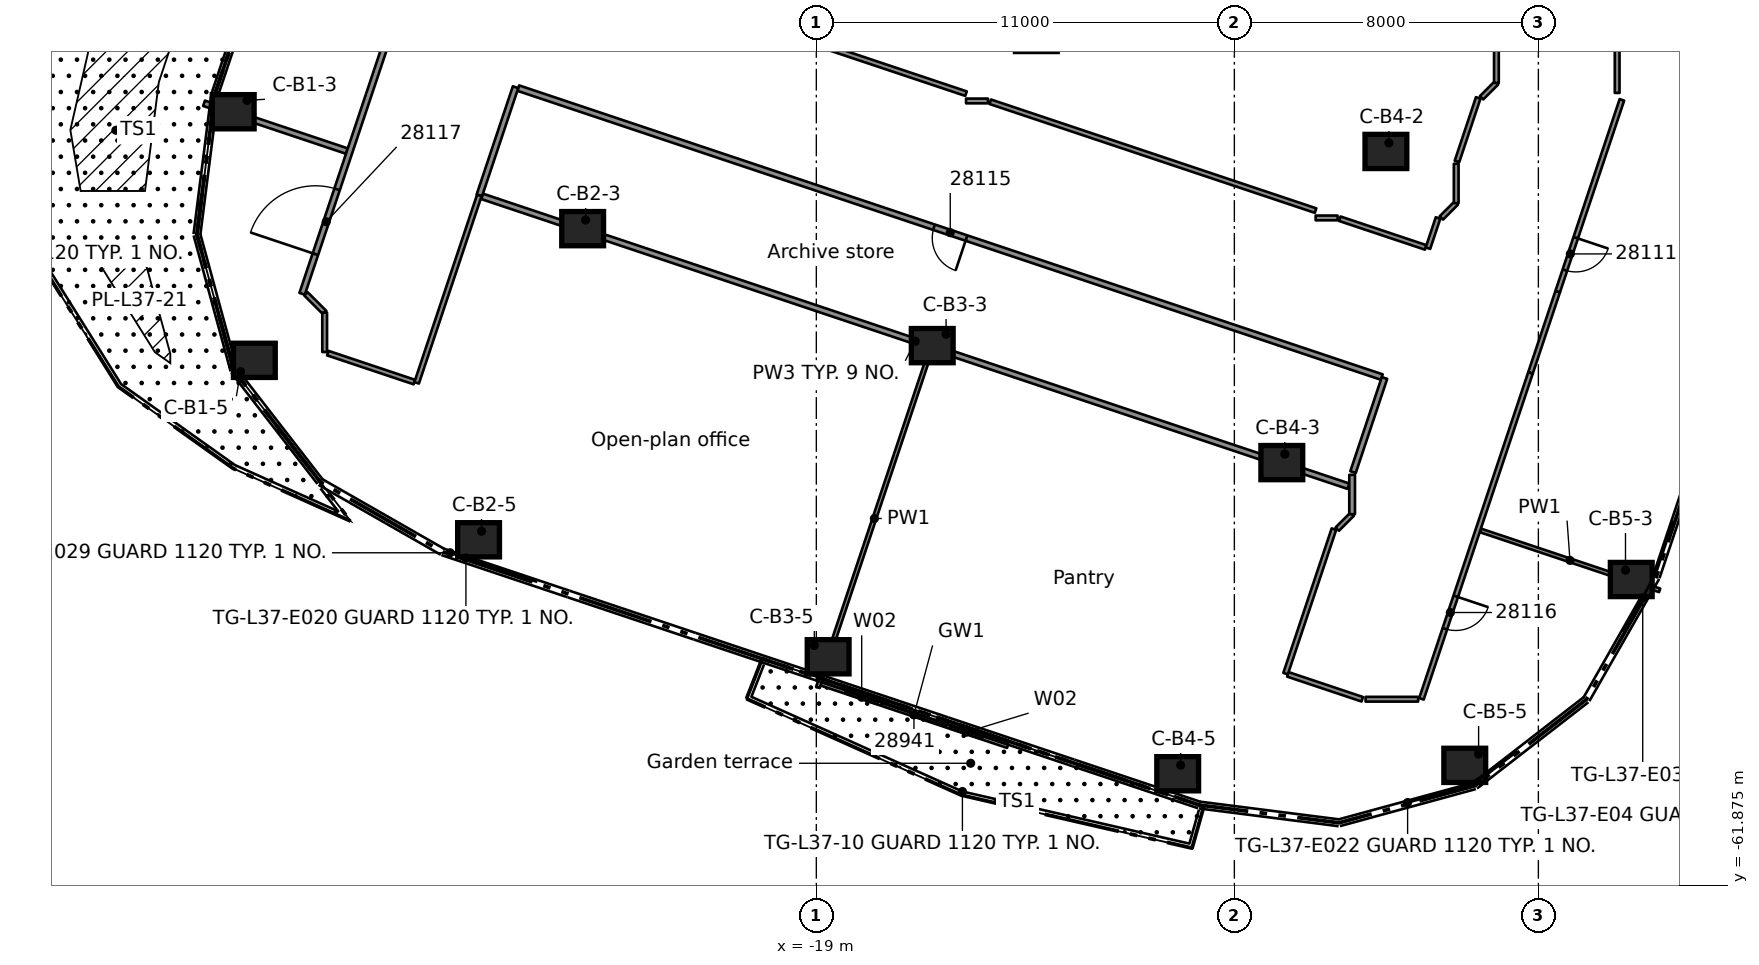
"""IFC4 building model, lengths in metres.
Left out: names, types, materials, properties, quantities, classifications, styles, units other than length and angle.
Written with IfcOpenShell. Run it as: python <this file> out.ifc"""

import sys

from ifc_helpers import new_model, si_unit, direction, frame, frame_2d, origin, origin_2d, place, context, subcontext, project, spatial, rectangle, extrude, element, fill, save


model = new_model("IFC4")
c1 = context("Model", 3, precision=1e-05, world=origin(), true_north=direction((0.0, 1.0)))
c2 = subcontext(c1, "Body", "Model", "MODEL_VIEW")
j1 = project(units=[si_unit("LENGTHUNIT", "METRE"), si_unit("PLANEANGLEUNIT", "RADIAN")], contexts=[c1])
p1 = place(None, origin())
s1 = spatial("IfcSite", under=j1, at=p1, CompositionType="ELEMENT")
p2 = place(p1, origin())
s2 = spatial("IfcBuilding", under=s1, at=p2, CompositionType="ELEMENT")
p3 = place(p2, frame((0.0, 0.0, 145.6)))
s3 = spatial("IfcBuildingStorey", under=s2, at=p3, CompositionType="ELEMENT", Elevation=145.6)
for number, where, z_axis, x_axis in (
    (1, (-34.344, -41.515, 0.0), (0.0, 0.0, 1.0), (1.0, 0.0, 0.0)),
    (2, (-33.788, -48.056, 0.0), (0.0, 0.0, 1.0), (1.0, 0.0, 0.0)),
    (3, (-25.149, -44.591, 0.0), (0.0, 0.0, 1.0), (1.0, 0.0, 0.0)),
    (4, (-27.888, -52.778, 0.0), (0.0, 0.0, 1.0), (1.0, 0.0, 0.0)),
    (5, (-15.95, -47.669, 0.0), (0.0, 0.0, 1.0), (1.0, 0.0, 0.0)),
    (6, (-18.689, -55.856, 0.0), (0.0, 0.0, 1.0), (1.0, 0.0, 0.0)),
    (7, (-4.012, -42.56, 0.0), (0.0, 0.0, 1.0), (1.0, 0.0, 0.0)),
    (8, (-6.751, -50.747, 0.0), (0.0, 0.0, 1.0), (1.0, 0.0, 0.0)),
    (9, (-9.491, -58.934, 0.0), (0.0, 0.0, 1.0), (1.0, 0.0, 0.0)),
    (10, (2.444, -53.823, 0.0), (0.0, 0.0, 1.0), (1.0, 0.0, 0.0)),
    (11, (-1.937, -58.713, 0.0), (0.0, 0.0, 1.0), (1.0, 0.0, 0.0)),
):
    element("IfcColumn", number, at=place(p3, frame(where, z_axis=z_axis, x_axis=x_axis)), inside=s3, PredefinedType="COLUMN", context=c2, shape_type="SweptSolid", body=[
        extrude(rectangle(XDim=1.1, YDim=0.9, at=origin_2d()), origin(), (0.0, 0.0, 1.0), 3.5),
    ])
p4 = place(p3, frame((-13.966, -58.207, 0.0), z_axis=(0.0, 0.0, 1.0), x_axis=(-0.948325862879, 0.31729805829, 0.0)))
e12 = element("IfcWall", 12, at=p4, inside=s3, PredefinedType="STANDARD", context=c2, shape_type="SweptSolid", body=[
    extrude(rectangle(XDim=5.2, YDim=0.1, at=frame_2d((2.6, 0.0))), origin(), (0.0, 0.0, 1.0), 3.1),
])
p5 = place(p4, frame((1.7, 0.0, 0.0)))
e13 = element("IfcOpeningElement", 13, at=p5, cuts=e12, PredefinedType="OPENING", context=c2, shape_type="SweptSolid", body=[
    extrude(rectangle(XDim=1.8, YDim=2.4, at=frame_2d((0.9, 1.2))), frame((0.0, 0.06, 0.0), z_axis=(0.0, -1.0, 0.0), x_axis=(1.0, 0.0, 0.0)), (0.0, 0.0, 1.0), 0.12),
])
p6 = place(p4, frame((0.7, 0.0, 0.0)))
e14 = element("IfcOpeningElement", 14, at=p6, cuts=e12, PredefinedType="OPENING", context=c2, shape_type="SweptSolid", body=[
    extrude(rectangle(XDim=0.9, YDim=2.4, at=frame_2d((0.45, 1.2))), frame((0.0, 0.06, 0.0), z_axis=(0.0, -1.0, 0.0), x_axis=(1.0, 0.0, 0.0)), (0.0, 0.0, 1.0), 0.12),
])
p7 = place(p4, frame((3.6, 0.0, 0.0)))
e15 = element("IfcOpeningElement", 15, at=p7, cuts=e12, PredefinedType="OPENING", context=c2, shape_type="SweptSolid", body=[
    extrude(rectangle(XDim=0.9, YDim=2.4, at=frame_2d((0.45, 1.2))), frame((0.0, 0.06, 0.0), z_axis=(0.0, -1.0, 0.0), x_axis=(1.0, 0.0, 0.0)), (0.0, 0.0, 1.0), 0.12),
])
p8 = place(p3, frame((-31.856, -47.866, 0.0), z_axis=(0.0, 0.0, 1.0), x_axis=(0.948398445466, -0.317081044274, 0.0)))
e16 = element("IfcWall", 16, at=p8, inside=s3, PredefinedType="PARTITIONING", context=c2, shape_type="SweptSolid", body=[
    extrude(rectangle(XDim=2.403, YDim=0.125, at=frame_2d((1.202, 0.0))), origin(), (0.0, 0.0, 1.0), 3.08),
])
p9 = place(p3, frame((-6.592, -56.319, 0.0), z_axis=(0.0, 0.0, 1.0), x_axis=(0.948339824369, -0.317256327778, 0.0)))
e17 = element("IfcWall", 17, at=p9, inside=s3, PredefinedType="PARTITIONING", context=c2, shape_type="SweptSolid", body=[
    extrude(rectangle(XDim=2.065, YDim=0.125, at=frame_2d((1.032, 0.0))), origin(), (0.0, 0.0, 1.0), 3.08),
])
p10 = place(p3, frame((-35.112, -41.292, 0.0), z_axis=(0.0, 0.0, 1.0), x_axis=(0.948300748581, -0.317373108881, 0.0)))
e18 = element("IfcWall", 18, at=p10, inside=s3, PredefinedType="PARTITIONING", context=c2, shape_type="SweptSolid", body=[
    extrude(rectangle(XDim=3.964, YDim=0.15, at=frame_2d((1.982, 0.0))), origin(), (0.0, 0.0, 1.0), 3.08),
])
p11 = place(p3, frame((-27.797, -43.741, 0.0), z_axis=(0.0, 0.0, 1.0), x_axis=(0.948342550157, -0.31724817976, 0.0)))
e19 = element("IfcWall", 19, at=p11, inside=s3, PredefinedType="PARTITIONING", context=c2, shape_type="SweptSolid", body=[
    extrude(rectangle(XDim=24.041, YDim=0.15, at=frame_2d((12.021, 0.0))), origin(), (0.0, 0.0, 1.0), 3.08),
])
p12 = place(p3, frame((-1.528, -52.53, 0.0), z_axis=(0.0, 0.0, 1.0), x_axis=(0.948388493502, -0.317110809328, 0.0)))
e20 = element("IfcWall", 20, at=p12, inside=s3, PredefinedType="PARTITIONING", context=c2, shape_type="SweptSolid", body=[
    extrude(rectangle(XDim=4.976, YDim=0.1, at=frame_2d((2.488, 0.0))), origin(), (0.0, 0.0, 1.0), 3.08),
])
p13 = place(p3, frame((-4.12, -48.496, 0.0), z_axis=(0.0, 0.0, 1.0), x_axis=(-0.948327115108, 0.31729431566, 0.0)))
e21 = element("IfcWall", 21, at=p13, inside=s3, PredefinedType="PARTITIONING", context=c2, shape_type="SweptSolid", body=[
    extrude(rectangle(XDim=23.962, YDim=0.15, at=frame_2d((11.981, 0.0))), origin(), (0.0, 0.0, 1.0), 3.08),
])
p14 = place(p13, frame((11.525, 0.0, 0.0)))
e22 = element("IfcOpeningElement", 22, at=p14, cuts=e21, PredefinedType="OPENING", context=c2, shape_type="SweptSolid", body=[
    extrude(rectangle(XDim=0.9, YDim=2.1, at=frame_2d((0.45, 1.05))), frame((0.0, 0.085, 0.0), z_axis=(0.0, -1.0, 0.0), x_axis=(1.0, 0.0, 0.0)), (0.0, 0.0, 1.0), 0.17),
])
p15 = place(p3, frame((-23.623, -38.174, 0.0), z_axis=(0.0, 0.0, 1.0), x_axis=(0.948317616384, -0.317322703971, 0.0)))
e23 = element("IfcWall", 23, at=p15, inside=s3, PredefinedType="PARTITIONING", context=c2, shape_type="SweptSolid", body=[
    extrude(rectangle(XDim=9.029, YDim=0.125, at=frame_2d((4.514, 0.0))), origin(), (0.0, 0.0, 1.0), 3.08),
])
p16 = place(p15, frame((4.038, 0.0, 0.0)))
e24 = element("IfcOpeningElement", 24, at=p16, cuts=e23, PredefinedType="OPENING", context=c2, shape_type="SweptSolid", body=[
    extrude(rectangle(XDim=0.9, YDim=2.1, at=frame_2d((0.45, 1.05))), frame((0.0, 0.073, 0.0), z_axis=(0.0, -1.0, 0.0), x_axis=(1.0, 0.0, 0.0)), (0.0, 0.0, 1.0), 0.145),
])
p17 = place(p3, frame((-14.424, -41.252, 0.0), z_axis=(0.0, 0.0, 1.0), x_axis=(0.948339274477, -0.317257971508, 0.0)))
e25 = element("IfcWall", 25, at=p17, inside=s3, PredefinedType="PARTITIONING", context=c2, shape_type="SweptSolid", body=[
    extrude(rectangle(XDim=9.027, YDim=0.125, at=frame_2d((4.514, 0.0))), origin(), (0.0, 0.0, 1.0), 3.08),
])
p18 = place(p3, frame((-5.225, -44.33, 0.0), z_axis=(0.0, 0.0, 1.0), x_axis=(0.948488440949, -0.316811738081, 0.0)))
e26 = element("IfcWall", 26, at=p18, inside=s3, PredefinedType="PARTITIONING", context=c2, shape_type="SweptSolid", body=[
    extrude(rectangle(XDim=2.383, YDim=0.125, at=frame_2d((1.191, 0.0))), origin(), (0.0, 0.0, 1.0), 3.08),
])
p19 = place(p3, frame((-4.547, -56.973, 0.0), z_axis=(0.0, 0.0, 1.0), x_axis=(1.0, 0.0, 0.0)))
e27 = element("IfcWall", 27, at=p19, inside=s3, PredefinedType="PARTITIONING", context=c2, shape_type="SweptSolid", body=[
    extrude(rectangle(XDim=1.383, YDim=0.125, at=frame_2d((0.691, 0.0))), origin(), (0.0, 0.0, 1.0), 3.08),
])
p20 = place(p3, frame((-5.292, -52.496, 0.0), z_axis=(0.0, 0.0, 1.0), x_axis=(0.707106781187, 0.707106781187, 0.0)))
e28 = element("IfcWall", 28, at=p20, inside=s3, PredefinedType="PARTITIONING", context=c2, shape_type="SweptSolid", body=[
    extrude(rectangle(XDim=0.553, YDim=0.125, at=frame_2d((0.277, 0.0))), origin(), (0.0, 0.0, 1.0), 3.08),
])
p21 = place(p3, frame((-32.431, -46.306, 0.0), z_axis=(0.0, 0.0, 1.0), x_axis=(0.706931689754, -0.707281829274, 0.0)))
e29 = element("IfcWall", 29, at=p21, inside=s3, PredefinedType="PARTITIONING", context=c2, shape_type="SweptSolid", body=[
    extrude(rectangle(XDim=0.697, YDim=0.125, at=frame_2d((0.349, 0.0))), origin(), (0.0, 0.0, 1.0), 3.08),
])
p22 = place(p3, frame((-5.861, -44.309, 0.0), z_axis=(0.0, 0.0, 1.0), x_axis=(1.0, 0.0, 0.0)))
e30 = element("IfcWall", 30, at=p22, inside=s3, PredefinedType="PARTITIONING", context=c2, shape_type="SweptSolid", body=[
    extrude(rectangle(XDim=0.577, YDim=0.125, at=frame_2d((0.289, 0.0))), origin(), (0.0, 0.0, 1.0), 3.08),
])
p23 = place(p3, frame((-2.553, -44.309, 0.0), z_axis=(0.0, 0.0, 1.0), x_axis=(0.706885982832, 0.707327510617, 0.0)))
e31 = element("IfcWall", 31, at=p23, inside=s3, PredefinedType="PARTITIONING", context=c2, shape_type="SweptSolid", body=[
    extrude(rectangle(XDim=0.553, YDim=0.125, at=frame_2d((0.276, 0.0))), origin(), (0.0, 0.0, 1.0), 3.08),
])
p24 = place(p3, frame((-15.06, -41.231, 0.0), z_axis=(0.0, 0.0, 1.0), x_axis=(1.0, 0.0, 0.0)))
e32 = element("IfcWall", 32, at=p24, inside=s3, PredefinedType="PARTITIONING", context=c2, shape_type="SweptSolid", body=[
    extrude(rectangle(XDim=0.576, YDim=0.125, at=frame_2d((0.288, 0.0))), origin(), (0.0, 0.0, 1.0), 3.08),
])
p25 = place(p3, frame((-1.495, -41.148, 0.0), z_axis=(0.0, 0.0, 1.0), x_axis=(0.707327510617, 0.706885982832, 0.0)))
e33 = element("IfcWall", 33, at=p25, inside=s3, PredefinedType="PARTITIONING", context=c2, shape_type="SweptSolid", body=[
    extrude(rectangle(XDim=0.553, YDim=0.125, at=frame_2d((0.276, 0.0))), origin(), (0.0, 0.0, 1.0), 3.08),
])
p26 = place(p3, frame((-0.207, -48.385, 0.0), z_axis=(0.0, 0.0, 1.0), x_axis=(0.317591795151, 0.948227531584, 0.0)))
e34 = element("IfcWall", 34, at=p26, inside=s3, PredefinedType="PARTITIONING", context=c2, shape_type="SweptSolid", body=[
    extrude(rectangle(XDim=2.255, YDim=0.125, at=frame_2d((1.127, 0.0))), origin(), (0.0, 0.0, 1.0), 3.08),
])
p27 = place(p3, frame((-0.208, -48.388, 0.0), z_axis=(0.0, 0.0, 1.0), x_axis=(-0.317280583106, -0.94833170968, 0.0)))
e35 = element("IfcWall", 35, at=p27, inside=s3, PredefinedType="PARTITIONING", context=c2, shape_type="SweptSolid", body=[
    extrude(rectangle(XDim=9.042, YDim=0.125, at=frame_2d((4.521, 0.0))), origin(), (0.0, 0.0, 1.0), 3.08),
])
p28 = place(p27, frame((6.197, 0.0, 0.0)))
e36 = element("IfcOpeningElement", 36, at=p28, cuts=e35, PredefinedType="OPENING", context=c2, shape_type="SweptSolid", body=[
    extrude(rectangle(XDim=0.9, YDim=2.1, at=frame_2d((0.45, 1.05))), frame((0.0, 0.073, 0.0), z_axis=(0.0, -1.0, 0.0), x_axis=(1.0, 0.0, 0.0)), (0.0, 0.0, 1.0), 0.145),
])
p29 = place(p3, frame((2.198, -41.202, 0.0), z_axis=(0.0, 0.0, 1.0), x_axis=(-0.317452710065, -0.948274104293, 0.0)))
e37 = element("IfcWall", 37, at=p29, inside=s3, PredefinedType="PARTITIONING", context=c2, shape_type="SweptSolid", body=[
    extrude(rectangle(XDim=5.32, YDim=0.125, at=frame_2d((2.66, 0.0))), origin(), (0.0, 0.0, 1.0), 3.08),
])
p30 = place(p29, frame((3.825, 0.0, 0.0)))
e38 = element("IfcOpeningElement", 38, at=p30, cuts=e37, PredefinedType="OPENING", context=c2, shape_type="SweptSolid", body=[
    extrude(rectangle(XDim=0.9, YDim=2.1, at=frame_2d((0.45, 1.05))), frame((0.0, 0.073, 0.0), z_axis=(0.0, -1.0, 0.0), x_axis=(1.0, 0.0, 0.0)), (0.0, 0.0, 1.0), 0.145),
])
p31 = place(p3, frame((-6.652, -56.299, 0.0), z_axis=(0.0, 0.0, 1.0), x_axis=(0.317323664318, 0.948317295036, 0.0)))
e39 = element("IfcWall", 39, at=p31, inside=s3, PredefinedType="PARTITIONING", context=c2, shape_type="SweptSolid", body=[
    extrude(rectangle(XDim=4.009, YDim=0.125, at=frame_2d((2.005, 0.0))), origin(), (0.0, 0.0, 1.0), 3.08),
])
p32 = place(p3, frame((-4.877, -50.997, 0.0), z_axis=(0.0, 0.0, 1.0), x_axis=(0.316984839345, 0.948430604539, 0.0)))
e40 = element("IfcWall", 40, at=p32, inside=s3, PredefinedType="PARTITIONING", context=c2, shape_type="SweptSolid", body=[
    extrude(rectangle(XDim=2.612, YDim=0.15, at=frame_2d((1.306, 0.0))), origin(), (0.0, 0.0, 1.0), 3.08),
])
p33 = place(p3, frame((-2.906, -45.105, 0.0), z_axis=(0.0, 0.0, 1.0), x_axis=(0.317450707718, 0.948274774614, 0.0)))
e41 = element("IfcWall", 41, at=p33, inside=s3, PredefinedType="PARTITIONING", context=c2, shape_type="SweptSolid", body=[
    extrude(rectangle(XDim=0.838, YDim=0.125, at=frame_2d((0.419, 0.0))), origin(), (0.0, 0.0, 1.0), 3.08),
])
p34 = place(p3, frame((-2.142, -42.823, 0.0), z_axis=(0.0, 0.0, 1.0), x_axis=(0.316933512953, 0.948447757321, 0.0)))
e42 = element("IfcWall", 42, at=p34, inside=s3, PredefinedType="PARTITIONING", context=c2, shape_type="SweptSolid", body=[
    extrude(rectangle(XDim=1.764, YDim=0.125, at=frame_2d((0.882, 0.0))), origin(), (0.0, 0.0, 1.0), 3.08),
])
p35 = place(p3, frame((-18.959, -56.663, 0.0), z_axis=(0.0, 0.0, 1.0), x_axis=(0.317204132015, 0.948357284272, 0.0)))
e43 = element("IfcWall", 43, at=p35, inside=s3, PredefinedType="PARTITIONING", context=c2, shape_type="SweptSolid", body=[
    extrude(rectangle(XDim=9.375, YDim=0.1, at=frame_2d((4.688, 0.0))), origin(), (0.0, 0.0, 1.0), 3.08),
])
p36 = place(p3, frame((-27.868, -43.717, 0.0), z_axis=(0.0, 0.0, 1.0), x_axis=(0.317276218283, 0.948333169995, 0.0)))
e44 = element("IfcWall", 44, at=p36, inside=s3, PredefinedType="PARTITIONING", context=c2, shape_type="SweptSolid", body=[
    extrude(rectangle(XDim=3.003, YDim=0.15, at=frame_2d((1.502, 0.0))), origin(), (0.0, 0.0, 1.0), 3.08),
])
p37 = place(p3, frame((-29.517, -48.648, 0.0), z_axis=(0.0, 0.0, 1.0), x_axis=(0.317185500333, 0.948363515947, 0.0)))
e45 = element("IfcWall", 45, at=p37, inside=s3, PredefinedType="PARTITIONING", context=c2, shape_type="SweptSolid", body=[
    extrude(rectangle(XDim=5.199, YDim=0.125, at=frame_2d((2.6, 0.0))), origin(), (0.0, 0.0, 1.0), 3.08),
])
p38 = place(p3, frame((-32.531, -46.306, 0.0), z_axis=(0.0, 0.0, 1.0), x_axis=(0.317372718061, 0.948300879379, 0.0)))
e46 = element("IfcWall", 46, at=p38, inside=s3, PredefinedType="PARTITIONING", context=c2, shape_type="SweptSolid", body=[
    extrude(rectangle(XDim=16.309, YDim=0.15, at=frame_2d((8.155, 0.0))), origin(), (0.0, 0.0, 1.0), 3.08),
])
p39 = place(p38, frame((8.289, 0.0, 0.0)))
e47 = element("IfcOpeningElement", 47, at=p39, cuts=e46, PredefinedType="OPENING", context=c2, shape_type="SweptSolid", body=[
    extrude(rectangle(XDim=0.9, YDim=2.1, at=frame_2d((0.45, 1.05))), frame((0.0, 0.085, 0.0), z_axis=(0.0, -1.0, 0.0), x_axis=(1.0, 0.0, 0.0)), (0.0, 0.0, 1.0), 0.17),
])
p40 = place(p38, frame((1.1, 0.0, 0.0)))
e48 = element("IfcOpeningElement", 48, at=p40, cuts=e46, PredefinedType="OPENING", context=c2, shape_type="SweptSolid", body=[
    extrude(rectangle(XDim=1.8, YDim=2.1, at=frame_2d((0.9, 1.05))), frame((0.0, 0.085, 0.0), z_axis=(0.0, -1.0, 0.0), x_axis=(1.0, 0.0, 0.0)), (0.0, 0.0, 1.0), 0.17),
])
p41 = place(p38, frame((13.985, 0.0, 0.0)))
e49 = element("IfcOpeningElement", 49, at=p41, cuts=e46, PredefinedType="OPENING", context=c2, shape_type="SweptSolid", body=[
    extrude(rectangle(XDim=1.0, YDim=2.1, at=frame_2d((0.5, 1.05))), frame((0.0, 0.085, 0.0), z_axis=(0.0, -1.0, 0.0), x_axis=(1.0, 0.0, 0.0)), (0.0, 0.0, 1.0), 0.17),
])
p42 = place(p3, frame((2.073, -41.02, 0.0), z_axis=(0.0, 0.0, 1.0), x_axis=(0.0, 1.0, 0.0)))
e50 = element("IfcWall", 50, at=p42, inside=s3, PredefinedType="PARTITIONING", context=c2, shape_type="SweptSolid", body=[
    extrude(rectangle(XDim=1.919, YDim=0.125, at=frame_2d((0.959, 0.0))), origin(), (0.0, 0.0, 1.0), 3.08),
])
p43 = place(p3, frame((-1.104, -40.757, 0.0), z_axis=(0.0, 0.0, 1.0), x_axis=(0.0, 1.0, 0.0)))
e51 = element("IfcWall", 51, at=p43, inside=s3, PredefinedType="PARTITIONING", context=c2, shape_type="SweptSolid", body=[
    extrude(rectangle(XDim=1.037, YDim=0.125, at=frame_2d((0.519, 0.0))), origin(), (0.0, 0.0, 1.0), 3.08),
])
p44 = place(p3, frame((-2.162, -43.918, 0.0), z_axis=(0.0, 0.0, 1.0), x_axis=(0.0, 1.0, 0.0)))
e52 = element("IfcWall", 52, at=p44, inside=s3, PredefinedType="PARTITIONING", context=c2, shape_type="SweptSolid", body=[
    extrude(rectangle(XDim=1.036, YDim=0.125, at=frame_2d((0.518, 0.0))), origin(), (0.0, 0.0, 1.0), 3.08),
])
p45 = place(p3, frame((-4.901, -52.105, 0.0), z_axis=(0.0, 0.0, 1.0), x_axis=(0.0, 1.0, 0.0)))
e53 = element("IfcWall", 53, at=p45, inside=s3, PredefinedType="PARTITIONING", context=c2, shape_type="SweptSolid", body=[
    extrude(rectangle(XDim=1.037, YDim=0.15, at=frame_2d((0.519, 0.0))), origin(), (0.0, 0.0, 1.0), 3.08),
])
p46 = place(p3, frame((-31.938, -47.838, 0.0), z_axis=(0.0, 0.0, 1.0), x_axis=(0.0, 1.0, 0.0)))
e54 = element("IfcWall", 54, at=p46, inside=s3, PredefinedType="PARTITIONING", context=c2, shape_type="SweptSolid", body=[
    extrude(rectangle(XDim=1.039, YDim=0.125, at=frame_2d((0.52, 0.0))), origin(), (0.0, 0.0, 1.0), 3.08),
])
p47 = place(p5, origin())
e55 = element("IfcDoor", 55, at=p47, inside=s3, OperationType="DOUBLE_DOOR_SLIDING", PredefinedType="DOOR", context=c2, shape_type="SweptSolid", body=[
    extrude(rectangle(XDim=1.8, YDim=2.4, at=frame_2d((0.9, 1.2))), frame((0.0, 0.025, 0.0), z_axis=(0.0, -1.0, 0.0), x_axis=(1.0, 0.0, 0.0)), (0.0, 0.0, 1.0), 0.05),
])
fill(e13, e55)
p48 = place(p6, origin())
e56 = element("IfcWindow", 56, at=p48, inside=s3, PartitioningType="SINGLE_PANEL", PredefinedType="WINDOW", context=c2, shape_type="SweptSolid", body=[
    extrude(rectangle(XDim=0.9, YDim=2.4, at=frame_2d((0.45, 1.2))), frame((0.0, 0.03, 0.0), z_axis=(0.0, -1.0, 0.0), x_axis=(1.0, 0.0, 0.0)), (0.0, 0.0, 1.0), 0.06),
])
fill(e14, e56)
p49 = place(p7, origin())
e57 = element("IfcWindow", 57, at=p49, inside=s3, PartitioningType="SINGLE_PANEL", PredefinedType="WINDOW", context=c2, shape_type="SweptSolid", body=[
    extrude(rectangle(XDim=0.9, YDim=2.4, at=frame_2d((0.45, 1.2))), frame((0.0, 0.03, 0.0), z_axis=(0.0, -1.0, 0.0), x_axis=(1.0, 0.0, 0.0)), (0.0, 0.0, 1.0), 0.06),
])
fill(e15, e57)
p50 = place(p30, origin())
e58 = element("IfcDoor", 58, at=p50, inside=s3, OperationType="SINGLE_SWING_RIGHT", PredefinedType="DOOR", context=c2, shape_type="SweptSolid", body=[
    extrude(rectangle(XDim=0.9, YDim=2.1, at=frame_2d((0.45, 1.05))), frame((0.0, 0.025, 0.0), z_axis=(0.0, -1.0, 0.0), x_axis=(1.0, 0.0, 0.0)), (0.0, 0.0, 1.0), 0.05),
])
fill(e38, e58)
p51 = place(p14, origin())
e59 = element("IfcDoor", 59, at=p51, inside=s3, OperationType="SINGLE_SWING_LEFT", PredefinedType="DOOR", context=c2, shape_type="SweptSolid", body=[
    extrude(rectangle(XDim=0.9, YDim=2.1, at=frame_2d((0.45, 1.05))), frame((0.0, 0.025, 0.0), z_axis=(0.0, -1.0, 0.0), x_axis=(1.0, 0.0, 0.0)), (0.0, 0.0, 1.0), 0.05),
])
fill(e22, e59)
p52 = place(p28, origin())
e60 = element("IfcDoor", 60, at=p52, inside=s3, OperationType="SINGLE_SWING_RIGHT", PredefinedType="DOOR", context=c2, shape_type="SweptSolid", body=[
    extrude(rectangle(XDim=0.9, YDim=2.1, at=frame_2d((0.45, 1.05))), frame((0.0, 0.025, 0.0), z_axis=(0.0, -1.0, 0.0), x_axis=(1.0, 0.0, 0.0)), (0.0, 0.0, 1.0), 0.05),
])
fill(e36, e60)
p53 = place(p40, origin())
e61 = element("IfcDoor", 61, at=p53, inside=s3, OperationType="DOUBLE_DOOR_SINGLE_SWING", PredefinedType="DOOR", context=c2, shape_type="SweptSolid", body=[
    extrude(rectangle(XDim=1.8, YDim=2.1, at=frame_2d((0.9, 1.05))), frame((0.0, 0.025, 0.0), z_axis=(0.0, -1.0, 0.0), x_axis=(1.0, 0.0, 0.0)), (0.0, 0.0, 1.0), 0.05),
])
fill(e48, e61)
save(model, sys.argv[1])
